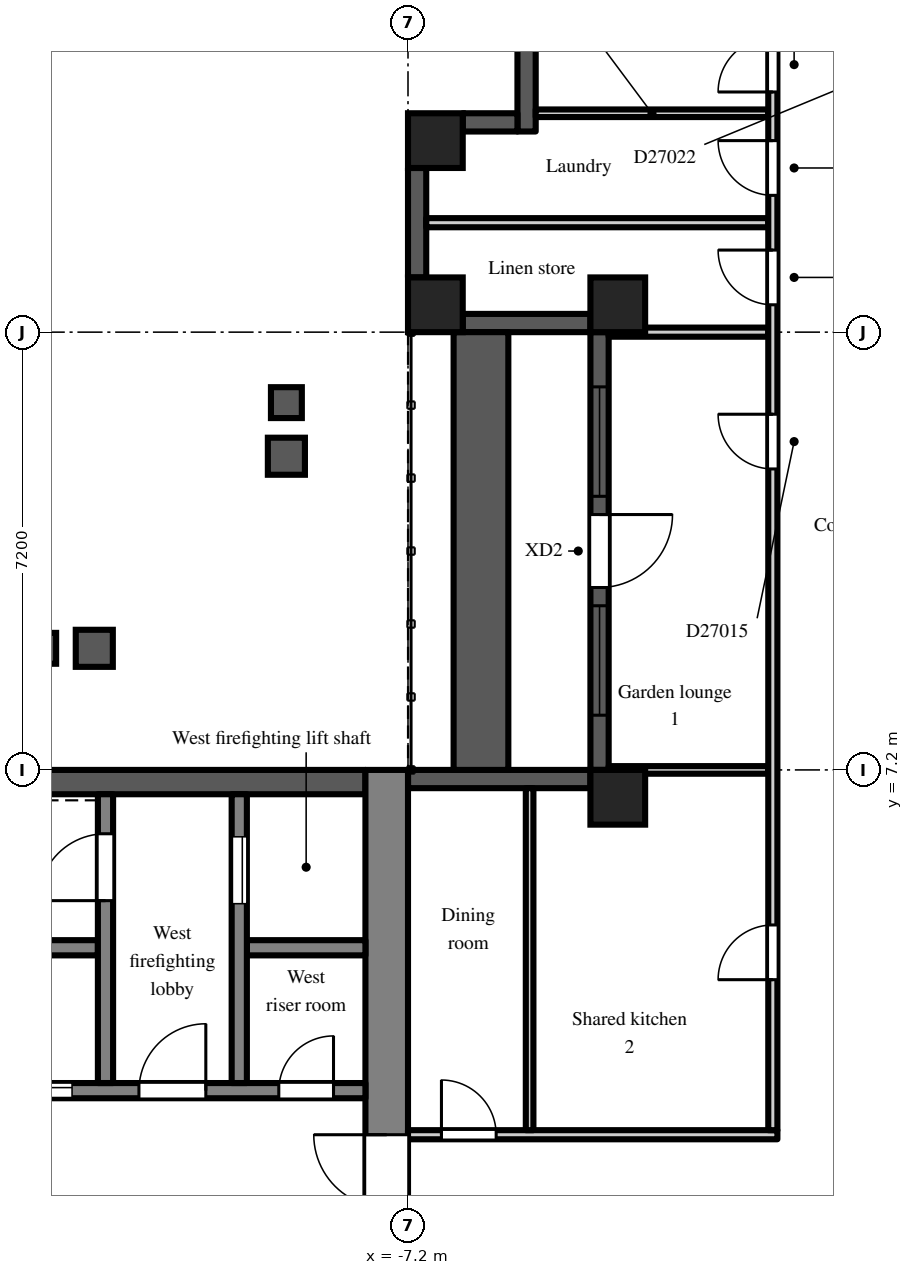
"""IFC4 building model, lengths in metres.
Left out: names, types, materials, properties, quantities, classifications, styles, units other than length and angle.
Written with IfcOpenShell. Run it as: python <this file> out.ifc"""

import sys

from ifc_helpers import new_model, si_unit, direction, frame, frame_2d, origin, origin_2d, place, context, subcontext, project, spatial, rectangle, extrude, element, fill, save


model = new_model("IFC4")
c1 = context("Model", 3, precision=1e-05, world=origin(), true_north=direction((0.0, 1.0)))
c2 = subcontext(c1, "Body", "Model", "MODEL_VIEW")
j1 = project(units=[si_unit("LENGTHUNIT", "METRE"), si_unit("PLANEANGLEUNIT", "RADIAN")], contexts=[c1])
p1 = place(None, origin())
s1 = spatial("IfcSite", under=j1, at=p1, CompositionType="ELEMENT")
p2 = place(p1, origin())
s2 = spatial("IfcBuilding", under=s1, at=p2, CompositionType="ELEMENT")
p3 = place(p2, frame((0.0, 0.0, 188.7)))
s3 = spatial("IfcBuildingStorey", under=s2, at=p3, CompositionType="ELEMENT", Elevation=188.7)
for number, where, z_axis, x_axis in (
    (1, (-6.75, 14.85, 0.0), (0.0, 0.0, 1.0), (1.0, 0.0, 0.0)),
    (2, (-6.75, 17.55, 0.0), (0.0, 0.0, 1.0), (1.0, 0.0, 0.0)),
    (3, (-3.75, 6.75, 0.0), (0.0, 0.0, 1.0), (1.0, 0.0, 0.0)),
    (4, (-3.75, 14.85, 0.0), (0.0, 0.0, 1.0), (1.0, 0.0, 0.0)),
):
    element("IfcColumn", number, at=place(p3, frame(where, z_axis=z_axis, x_axis=x_axis)), inside=s3, PredefinedType="COLUMN", context=c2, shape_type="SweptSolid", body=[
        extrude(rectangle(XDim=0.9, YDim=0.9, at=origin_2d()), origin(), (0.0, 0.0, 1.0), 3.0),
    ])
p4 = place(p3, frame((-5.25, 19.5, 0.0), z_axis=(0.0, 0.0, 1.0), x_axis=(0.0, -1.0, 0.0)))
e5 = element("IfcWall", 5, at=p4, inside=s3, PredefinedType="SOLIDWALL", context=c2, shape_type="SweptSolid", body=[
    extrude(rectangle(XDim=1.8, YDim=0.3, at=frame_2d((0.9, 0.0))), origin(), (0.0, 0.0, 1.0), 2.6),
])
p5 = place(p3, frame((-5.4, 17.85, 0.0), z_axis=(0.0, 0.0, 1.0), x_axis=(-1.0, 0.0, 0.0)))
e6 = element("IfcWall", 6, at=p5, inside=s3, PredefinedType="SOLIDWALL", context=c2, shape_type="SweptSolid", body=[
    extrude(rectangle(XDim=0.9, YDim=0.3, at=frame_2d((0.45, 0.0))), origin(), (0.0, 0.0, 1.0), 2.6),
])
p6 = place(p3, frame((-7.05, 17.1, 0.0), z_axis=(0.0, 0.0, 1.0), x_axis=(0.0, -1.0, 0.0)))
e7 = element("IfcWall", 7, at=p6, inside=s3, PredefinedType="SOLIDWALL", context=c2, shape_type="SweptSolid", body=[
    extrude(rectangle(XDim=1.8, YDim=0.3, at=frame_2d((0.9, 0.0))), origin(), (0.0, 0.0, 1.0), 2.2),
])
p7 = place(p3, frame((-6.3, 14.55, 0.0), z_axis=(0.0, 0.0, 1.0), x_axis=(1.0, 0.0, 0.0)))
e8 = element("IfcWall", 8, at=p7, inside=s3, PredefinedType="SOLIDWALL", context=c2, shape_type="SweptSolid", body=[
    extrude(rectangle(XDim=2.1, YDim=0.3, at=frame_2d((1.05, 0.0))), origin(), (0.0, 0.0, 1.0), 2.2),
])
p8 = place(p3, frame((-4.05, 14.4, 0.0), z_axis=(0.0, 0.0, 1.0), x_axis=(0.0, -1.0, 0.0)))
e9 = element("IfcWall", 9, at=p8, inside=s3, PredefinedType="SOLIDWALL", context=c2, shape_type="SweptSolid", body=[
    extrude(rectangle(XDim=7.2, YDim=0.3, at=frame_2d((3.6, 0.0))), origin(), (0.0, 0.0, 1.0), 2.2),
])
p9 = place(p8, frame((3.0, 0.0, 0.0)))
e10 = element("IfcOpeningElement", 10, at=p9, cuts=e9, PredefinedType="OPENING", context=c2, shape_type="SweptSolid", body=[
    extrude(rectangle(XDim=1.2, YDim=2.05, at=frame_2d((0.6, 1.025))), frame((0.0, 0.16, 0.0), z_axis=(0.0, -1.0, 0.0), x_axis=(1.0, 0.0, 0.0)), (0.0, 0.0, 1.0), 0.32),
])
p10 = place(p8, frame((0.9, 0.0, 0.2)))
e11 = element("IfcOpeningElement", 11, at=p10, cuts=e9, PredefinedType="OPENING", context=c2, shape_type="SweptSolid", body=[
    extrude(rectangle(XDim=1.8, YDim=1.85, at=frame_2d((0.9, 0.925))), frame((0.0, 0.16, 0.0), z_axis=(0.0, -1.0, 0.0), x_axis=(1.0, 0.0, 0.0)), (0.0, 0.0, 1.0), 0.32),
])
p11 = place(p8, frame((4.5, 0.0, 0.2)))
e12 = element("IfcOpeningElement", 12, at=p11, cuts=e9, PredefinedType="OPENING", context=c2, shape_type="SweptSolid", body=[
    extrude(rectangle(XDim=1.8, YDim=1.85, at=frame_2d((0.9, 0.925))), frame((0.0, 0.16, 0.0), z_axis=(0.0, -1.0, 0.0), x_axis=(1.0, 0.0, 0.0)), (0.0, 0.0, 1.0), 0.32),
])
p12 = place(p3, frame((-4.2, 7.05, 0.0), z_axis=(0.0, 0.0, 1.0), x_axis=(-1.0, 0.0, 0.0)))
e13 = element("IfcWall", 13, at=p12, inside=s3, PredefinedType="SOLIDWALL", context=c2, shape_type="SweptSolid", body=[
    extrude(rectangle(XDim=3.0, YDim=0.3, at=frame_2d((1.5, 0.0))), origin(), (0.0, 0.0, 1.0), 2.2),
])
p13 = place(p3, frame((-6.0, 7.2, 0.0), z_axis=(0.0, 0.0, 1.0), x_axis=(0.0, 1.0, 0.0)))
e14 = element("IfcWall", 14, at=p13, inside=s3, PredefinedType="PARAPET", context=c2, shape_type="SweptSolid", body=[
    extrude(rectangle(XDim=7.2, YDim=0.9, at=frame_2d((3.6, 0.0))), origin(), (0.0, 0.0, 1.0), 0.8),
])
p14 = place(p3, frame((-7.55, -7.2, 0.0), z_axis=(0.0, 0.0, 1.0), x_axis=(0.0, 1.0, 0.0)))
e15 = element("IfcWall", 15, at=p14, inside=s3, PredefinedType="SHEAR", context=c2, shape_type="SweptSolid", body=[
    extrude(rectangle(XDim=14.4, YDim=0.7, at=frame_2d((7.2, 0.0))), origin(), (0.0, 0.0, 1.0), 2.6),
])
p15 = place(p14, frame((6.0, 0.0, 0.0)))
e16 = element("IfcOpeningElement", 16, at=p15, cuts=e15, PredefinedType="OPENING", context=c2, shape_type="SweptSolid", body=[
    extrude(rectangle(XDim=2.4, YDim=2.2, at=frame_2d((1.2, 1.1))), frame((0.0, 0.36, 0.0), z_axis=(0.0, -1.0, 0.0), x_axis=(1.0, 0.0, 0.0)), (0.0, 0.0, 1.0), 0.72),
])
p16 = place(p3, frame((-7.9, 7.0, 0.0), z_axis=(0.0, 0.0, 1.0), x_axis=(-1.0, 0.0, 0.0)))
e17 = element("IfcWall", 17, at=p16, inside=s3, PredefinedType="SHEAR", context=c2, shape_type="SweptSolid", body=[
    extrude(rectangle(XDim=12.95, YDim=0.4, at=frame_2d((6.475, 0.0))), origin(), (0.0, 0.0, 1.0), 2.6),
])
p17 = place(p3, frame((-7.9, 1.925, 0.0), z_axis=(0.0, 0.0, 1.0), x_axis=(-1.0, 0.0, 0.0)))
e18 = element("IfcWall", 18, at=p17, inside=s3, PredefinedType="SHEAR", context=c2, shape_type="SweptSolid", body=[
    extrude(rectangle(XDim=12.95, YDim=0.25, at=frame_2d((6.475, 0.0))), origin(), (0.0, 0.0, 1.0), 2.6),
])
p18 = place(p17, frame((4.825, 0.0, 0.0)))
e19 = element("IfcOpeningElement", 19, at=p18, cuts=e18, PredefinedType="OPENING", context=c2, shape_type="SweptSolid", body=[
    extrude(rectangle(XDim=1.1, YDim=2.1, at=frame_2d((0.55, 1.05))), frame((0.0, 0.135, 0.0), z_axis=(0.0, -1.0, 0.0), x_axis=(1.0, 0.0, 0.0)), (0.0, 0.0, 1.0), 0.27),
])
p19 = place(p17, frame((7.025, 0.0, 0.0)))
e20 = element("IfcOpeningElement", 20, at=p19, cuts=e18, PredefinedType="OPENING", context=c2, shape_type="SweptSolid", body=[
    extrude(rectangle(XDim=1.1, YDim=2.1, at=frame_2d((0.55, 1.05))), frame((0.0, 0.135, 0.0), z_axis=(0.0, -1.0, 0.0), x_axis=(1.0, 0.0, 0.0)), (0.0, 0.0, 1.0), 0.27),
])
p20 = place(p17, frame((9.225, 0.0, 0.0)))
e21 = element("IfcOpeningElement", 21, at=p20, cuts=e18, PredefinedType="OPENING", context=c2, shape_type="SweptSolid", body=[
    extrude(rectangle(XDim=1.1, YDim=2.1, at=frame_2d((0.55, 1.05))), frame((0.0, 0.135, 0.0), z_axis=(0.0, -1.0, 0.0), x_axis=(1.0, 0.0, 0.0)), (0.0, 0.0, 1.0), 0.27),
])
p21 = place(p17, frame((0.525, 0.0, 0.0)))
e22 = element("IfcOpeningElement", 22, at=p21, cuts=e18, PredefinedType="OPENING", context=c2, shape_type="SweptSolid", body=[
    extrude(rectangle(XDim=0.9, YDim=2.1, at=frame_2d((0.45, 1.05))), frame((0.0, 0.135, 0.0), z_axis=(0.0, -1.0, 0.0), x_axis=(1.0, 0.0, 0.0)), (0.0, 0.0, 1.0), 0.27),
])
p22 = place(p17, frame((2.625, 0.0, 0.0)))
e23 = element("IfcOpeningElement", 23, at=p22, cuts=e18, PredefinedType="OPENING", context=c2, shape_type="SweptSolid", body=[
    extrude(rectangle(XDim=1.1, YDim=2.1, at=frame_2d((0.55, 1.05))), frame((0.0, 0.135, 0.0), z_axis=(0.0, -1.0, 0.0), x_axis=(1.0, 0.0, 0.0)), (0.0, 0.0, 1.0), 0.27),
])
p23 = place(p17, frame((11.525, 0.0, 0.0)))
e24 = element("IfcOpeningElement", 24, at=p23, cuts=e18, PredefinedType="OPENING", context=c2, shape_type="SweptSolid", body=[
    extrude(rectangle(XDim=0.9, YDim=2.1, at=frame_2d((0.45, 1.05))), frame((0.0, 0.135, 0.0), z_axis=(0.0, -1.0, 0.0), x_axis=(1.0, 0.0, 0.0)), (0.0, 0.0, 1.0), 0.27),
])
p24 = place(p3, frame((-7.9, 4.275, 0.0), z_axis=(0.0, 0.0, 1.0), x_axis=(-1.0, 0.0, 0.0)))
e25 = element("IfcWall", 25, at=p24, inside=s3, PredefinedType="SHEAR", context=c2, shape_type="SweptSolid", body=[
    extrude(rectangle(XDim=1.95, YDim=0.25, at=frame_2d((0.975, 0.0))), origin(), (0.0, 0.0, 1.0), 2.6),
])
p25 = place(p3, frame((-12.3, 4.275, 0.0), z_axis=(0.0, 0.0, 1.0), x_axis=(-1.0, 0.0, 0.0)))
e26 = element("IfcWall", 26, at=p25, inside=s3, PredefinedType="SHEAR", context=c2, shape_type="SweptSolid", body=[
    extrude(rectangle(XDim=8.55, YDim=0.25, at=frame_2d((4.275, 0.0))), origin(), (0.0, 0.0, 1.0), 2.6),
])
p26 = place(p3, frame((-9.975, 2.05, 0.0), z_axis=(0.0, 0.0, 1.0), x_axis=(0.0, 1.0, 0.0)))
e27 = element("IfcWall", 27, at=p26, inside=s3, PredefinedType="SHEAR", context=c2, shape_type="SweptSolid", body=[
    extrude(rectangle(XDim=4.75, YDim=0.25, at=frame_2d((2.375, 0.0))), origin(), (0.0, 0.0, 1.0), 2.6),
])
p27 = place(p26, frame((2.95, 0.0, 0.0)))
e28 = element("IfcOpeningElement", 28, at=p27, cuts=e27, PredefinedType="OPENING", context=c2, shape_type="SweptSolid", body=[
    extrude(rectangle(XDim=1.1, YDim=2.1, at=frame_2d((0.55, 1.05))), frame((0.0, 0.135, 0.0), z_axis=(0.0, -1.0, 0.0), x_axis=(1.0, 0.0, 0.0)), (0.0, 0.0, 1.0), 0.27),
])
p28 = place(p3, frame((-12.175, 2.05, 0.0), z_axis=(0.0, 0.0, 1.0), x_axis=(0.0, 1.0, 0.0)))
e29 = element("IfcWall", 29, at=p28, inside=s3, PredefinedType="SHEAR", context=c2, shape_type="SweptSolid", body=[
    extrude(rectangle(XDim=4.75, YDim=0.25, at=frame_2d((2.375, 0.0))), origin(), (0.0, 0.0, 1.0), 2.6),
])
p29 = place(p28, frame((3.0, 0.0, 0.0)))
e30 = element("IfcOpeningElement", 30, at=p29, cuts=e29, PredefinedType="OPENING", context=c2, shape_type="SweptSolid", body=[
    extrude(rectangle(XDim=1.1, YDim=2.1, at=frame_2d((0.55, 1.05))), frame((0.0, 0.135, 0.0), z_axis=(0.0, -1.0, 0.0), x_axis=(1.0, 0.0, 0.0)), (0.0, 0.0, 1.0), 0.27),
])
p30 = place(p3, frame((-7.2, 1.2, 0.0), z_axis=(0.0, 0.0, 1.0), x_axis=(1.0, 0.0, 0.0)))
e31 = element("IfcWall", 31, at=p30, inside=s3, PredefinedType="PARTITIONING", context=c2, shape_type="SweptSolid", body=[
    extrude(rectangle(XDim=6.075, YDim=0.15, at=frame_2d((3.038, 0.0))), origin(), (0.0, 0.0, 1.0), 2.6),
])
p31 = place(p30, frame((0.55, 0.0, 0.0)))
e32 = element("IfcOpeningElement", 32, at=p31, cuts=e31, PredefinedType="OPENING", context=c2, shape_type="SweptSolid", body=[
    extrude(rectangle(XDim=0.9, YDim=2.1, at=frame_2d((0.45, 1.05))), frame((0.0, 0.085, 0.0), z_axis=(0.0, -1.0, 0.0), x_axis=(1.0, 0.0, 0.0)), (0.0, 0.0, 1.0), 0.17),
])
p32 = place(p3, frame((-6.9, 16.2, 0.0), z_axis=(0.0, 0.0, 1.0), x_axis=(1.0, 0.0, 0.0)))
e33 = element("IfcWall", 33, at=p32, inside=s3, PredefinedType="PARTITIONING", context=c2, shape_type="SweptSolid", body=[
    extrude(rectangle(XDim=5.625, YDim=0.15, at=frame_2d((2.812, 0.0))), origin(), (0.0, 0.0, 1.0), 2.6),
])
p33 = place(p3, frame((-5.2, 1.275, 0.0), z_axis=(0.0, 0.0, 1.0), x_axis=(0.0, 1.0, 0.0)))
e34 = element("IfcWall", 34, at=p33, inside=s3, PredefinedType="PARTITIONING", context=c2, shape_type="SweptSolid", body=[
    extrude(rectangle(XDim=5.625, YDim=0.125, at=frame_2d((2.812, 0.0))), origin(), (0.0, 0.0, 1.0), 2.6),
])
p34 = place(p3, frame((-5.1, 18.0, 0.0), z_axis=(0.0, 0.0, 1.0), x_axis=(1.0, 0.0, 0.0)))
e35 = element("IfcWall", 35, at=p34, inside=s3, PredefinedType="PARTITIONING", context=c2, shape_type="SweptSolid", body=[
    extrude(rectangle(XDim=3.825, YDim=0.125, at=frame_2d((1.913, 0.0))), origin(), (0.0, 0.0, 1.0), 2.6),
])
p35 = place(p3, frame((-3.9, 7.2, 0.0), z_axis=(0.0, 0.0, 1.0), x_axis=(1.0, 0.0, 0.0)))
e36 = element("IfcWall", 36, at=p35, inside=s3, PredefinedType="PARTITIONING", context=c2, shape_type="SweptSolid", body=[
    extrude(rectangle(XDim=2.625, YDim=0.125, at=frame_2d((1.312, 0.0))), origin(), (0.0, 0.0, 1.0), 2.6),
])
p36 = place(p3, frame((-3.9, 14.4, 0.0), z_axis=(0.0, 0.0, 1.0), x_axis=(1.0, 0.0, 0.0)))
e37 = element("IfcWall", 37, at=p36, inside=s3, PredefinedType="PARTITIONING", context=c2, shape_type="SweptSolid", body=[
    extrude(rectangle(XDim=2.625, YDim=0.15, at=frame_2d((1.312, 0.0))), origin(), (0.0, 0.0, 1.0), 2.6),
])
p37 = place(p3, frame((-1.2, 1.275, 0.0), z_axis=(0.0, 0.0, 1.0), x_axis=(0.0, 1.0, 0.0)))
e38 = element("IfcWall", 38, at=p37, inside=s3, PredefinedType="PARTITIONING", context=c2, shape_type="SweptSolid", body=[
    extrude(rectangle(XDim=18.25, YDim=0.15, at=frame_2d((9.125, 0.0))), origin(), (0.0, 0.0, 1.0), 2.6),
])
p38 = place(p37, frame((2.475, 0.0, 0.0)))
e39 = element("IfcOpeningElement", 39, at=p38, cuts=e38, PredefinedType="OPENING", context=c2, shape_type="SweptSolid", body=[
    extrude(rectangle(XDim=0.9, YDim=2.1, at=frame_2d((0.45, 1.05))), frame((0.0, 0.085, 0.0), z_axis=(0.0, -1.0, 0.0), x_axis=(1.0, 0.0, 0.0)), (0.0, 0.0, 1.0), 0.17),
])
p39 = place(p37, frame((10.875, 0.0, 0.0)))
e40 = element("IfcOpeningElement", 40, at=p39, cuts=e38, PredefinedType="OPENING", context=c2, shape_type="SweptSolid", body=[
    extrude(rectangle(XDim=0.9, YDim=2.1, at=frame_2d((0.45, 1.05))), frame((0.0, 0.085, 0.0), z_axis=(0.0, -1.0, 0.0), x_axis=(1.0, 0.0, 0.0)), (0.0, 0.0, 1.0), 0.17),
])
p40 = place(p37, frame((13.575, 0.0, 0.0)))
e41 = element("IfcOpeningElement", 41, at=p40, cuts=e38, PredefinedType="OPENING", context=c2, shape_type="SweptSolid", body=[
    extrude(rectangle(XDim=0.9, YDim=2.1, at=frame_2d((0.45, 1.05))), frame((0.0, 0.085, 0.0), z_axis=(0.0, -1.0, 0.0), x_axis=(1.0, 0.0, 0.0)), (0.0, 0.0, 1.0), 0.17),
])
p41 = place(p37, frame((15.375, 0.0, 0.0)))
e42 = element("IfcOpeningElement", 42, at=p41, cuts=e38, PredefinedType="OPENING", context=c2, shape_type="SweptSolid", body=[
    extrude(rectangle(XDim=0.9, YDim=2.1, at=frame_2d((0.45, 1.05))), frame((0.0, 0.085, 0.0), z_axis=(0.0, -1.0, 0.0), x_axis=(1.0, 0.0, 0.0)), (0.0, 0.0, 1.0), 0.17),
])
p42 = place(p37, frame((17.075, 0.0, 0.0)))
e43 = element("IfcOpeningElement", 43, at=p42, cuts=e38, PredefinedType="OPENING", context=c2, shape_type="SweptSolid", body=[
    extrude(rectangle(XDim=0.9, YDim=2.1, at=frame_2d((0.45, 1.05))), frame((0.0, 0.085, 0.0), z_axis=(0.0, -1.0, 0.0), x_axis=(1.0, 0.0, 0.0)), (0.0, 0.0, 1.0), 0.17),
])
p43 = place(p9, origin())
e44 = element("IfcDoor", 44, at=p43, inside=s3, OperationType="SINGLE_SWING_LEFT", PredefinedType="DOOR", context=c2, shape_type="SweptSolid", body=[
    extrude(rectangle(XDim=1.2, YDim=2.05, at=frame_2d((0.6, 1.025))), frame((0.0, 0.025, 0.0), z_axis=(0.0, -1.0, 0.0), x_axis=(1.0, 0.0, 0.0)), (0.0, 0.0, 1.0), 0.05),
])
fill(e10, e44)
p44 = place(p10, origin())
e45 = element("IfcWindow", 45, at=p44, inside=s3, PartitioningType="SINGLE_PANEL", PredefinedType="WINDOW", context=c2, shape_type="SweptSolid", body=[
    extrude(rectangle(XDim=1.8, YDim=1.85, at=frame_2d((0.9, 0.925))), frame((0.0, 0.03, 0.0), z_axis=(0.0, -1.0, 0.0), x_axis=(1.0, 0.0, 0.0)), (0.0, 0.0, 1.0), 0.06),
])
fill(e11, e45)
p45 = place(p11, origin())
e46 = element("IfcWindow", 46, at=p45, inside=s3, PartitioningType="SINGLE_PANEL", PredefinedType="WINDOW", context=c2, shape_type="SweptSolid", body=[
    extrude(rectangle(XDim=1.8, YDim=1.85, at=frame_2d((0.9, 0.925))), frame((0.0, 0.03, 0.0), z_axis=(0.0, -1.0, 0.0), x_axis=(1.0, 0.0, 0.0)), (0.0, 0.0, 1.0), 0.06),
])
fill(e12, e46)
p46 = place(p18, origin())
e47 = element("IfcDoor", 47, at=p46, inside=s3, OperationType="SLIDING_TO_LEFT", PredefinedType="DOOR", context=c2, shape_type="SweptSolid", body=[
    extrude(rectangle(XDim=1.1, YDim=2.1, at=frame_2d((0.55, 1.05))), frame((0.0, 0.025, 0.0), z_axis=(0.0, -1.0, 0.0), x_axis=(1.0, 0.0, 0.0)), (0.0, 0.0, 1.0), 0.05),
])
fill(e19, e47)
p47 = place(p27, origin())
e48 = element("IfcDoor", 48, at=p47, inside=s3, OperationType="SLIDING_TO_LEFT", PredefinedType="DOOR", context=c2, shape_type="SweptSolid", body=[
    extrude(rectangle(XDim=1.1, YDim=2.1, at=frame_2d((0.55, 1.05))), frame((0.0, 0.025, 0.0), z_axis=(0.0, -1.0, 0.0), x_axis=(1.0, 0.0, 0.0)), (0.0, 0.0, 1.0), 0.05),
])
fill(e28, e48)
p48 = place(p29, origin())
e49 = element("IfcDoor", 49, at=p48, inside=s3, OperationType="SINGLE_SWING_LEFT", PredefinedType="DOOR", context=c2, shape_type="SweptSolid", body=[
    extrude(rectangle(XDim=1.1, YDim=2.1, at=frame_2d((0.55, 1.05))), frame((0.0, 0.025, 0.0), z_axis=(0.0, -1.0, 0.0), x_axis=(1.0, 0.0, 0.0)), (0.0, 0.0, 1.0), 0.05),
])
fill(e30, e49)
p49 = place(p21, frame((0.9, 0.0, 0.0), z_axis=(0.0, 0.0, 1.0), x_axis=(-1.0, 0.0, 0.0)))
e50 = element("IfcDoor", 50, at=p49, inside=s3, OperationType="SINGLE_SWING_RIGHT", PredefinedType="DOOR", context=c2, shape_type="SweptSolid", body=[
    extrude(rectangle(XDim=0.9, YDim=2.1, at=frame_2d((0.45, 1.05))), frame((0.0, 0.025, 0.0), z_axis=(0.0, -1.0, 0.0), x_axis=(1.0, 0.0, 0.0)), (0.0, 0.0, 1.0), 0.05),
])
fill(e22, e50)
p50 = place(p22, frame((1.1, 0.0, 0.0), z_axis=(0.0, 0.0, 1.0), x_axis=(-1.0, 0.0, 0.0)))
e51 = element("IfcDoor", 51, at=p50, inside=s3, OperationType="SINGLE_SWING_RIGHT", PredefinedType="DOOR", context=c2, shape_type="SweptSolid", body=[
    extrude(rectangle(XDim=1.1, YDim=2.1, at=frame_2d((0.55, 1.05))), frame((0.0, 0.025, 0.0), z_axis=(0.0, -1.0, 0.0), x_axis=(1.0, 0.0, 0.0)), (0.0, 0.0, 1.0), 0.05),
])
fill(e23, e51)
p51 = place(p15, origin())
e52 = element("IfcDoor", 52, at=p51, inside=s3, OperationType="DOUBLE_DOOR_DOUBLE_SWING", PredefinedType="DOOR", context=c2, shape_type="SweptSolid", body=[
    extrude(rectangle(XDim=2.4, YDim=2.2, at=frame_2d((1.2, 1.1))), frame((0.0, 0.025, 0.0), z_axis=(0.0, -1.0, 0.0), x_axis=(1.0, 0.0, 0.0)), (0.0, 0.0, 1.0), 0.05),
])
fill(e16, e52)
p52 = place(p38, origin())
e53 = element("IfcDoor", 53, at=p52, inside=s3, OperationType="SINGLE_SWING_LEFT", PredefinedType="DOOR", context=c2, shape_type="SweptSolid", body=[
    extrude(rectangle(XDim=0.9, YDim=2.1, at=frame_2d((0.45, 1.05))), frame((0.0, 0.025, 0.0), z_axis=(0.0, -1.0, 0.0), x_axis=(1.0, 0.0, 0.0)), (0.0, 0.0, 1.0), 0.05),
])
fill(e39, e53)
p53 = place(p31, origin())
e54 = element("IfcDoor", 54, at=p53, inside=s3, OperationType="SINGLE_SWING_LEFT", PredefinedType="DOOR", context=c2, shape_type="SweptSolid", body=[
    extrude(rectangle(XDim=0.9, YDim=2.1, at=frame_2d((0.45, 1.05))), frame((0.0, 0.025, 0.0), z_axis=(0.0, -1.0, 0.0), x_axis=(1.0, 0.0, 0.0)), (0.0, 0.0, 1.0), 0.05),
])
fill(e32, e54)
p54 = place(p39, origin())
e55 = element("IfcDoor", 55, at=p54, inside=s3, OperationType="SINGLE_SWING_RIGHT", PredefinedType="DOOR", context=c2, shape_type="SweptSolid", body=[
    extrude(rectangle(XDim=0.9, YDim=2.1, at=frame_2d((0.45, 1.05))), frame((0.0, 0.025, 0.0), z_axis=(0.0, -1.0, 0.0), x_axis=(1.0, 0.0, 0.0)), (0.0, 0.0, 1.0), 0.05),
])
fill(e40, e55)
p55 = place(p40, origin())
e56 = element("IfcDoor", 56, at=p55, inside=s3, OperationType="SINGLE_SWING_RIGHT", PredefinedType="DOOR", context=c2, shape_type="SweptSolid", body=[
    extrude(rectangle(XDim=0.9, YDim=2.1, at=frame_2d((0.45, 1.05))), frame((0.0, 0.025, 0.0), z_axis=(0.0, -1.0, 0.0), x_axis=(1.0, 0.0, 0.0)), (0.0, 0.0, 1.0), 0.05),
])
fill(e41, e56)
p56 = place(p41, origin())
e57 = element("IfcDoor", 57, at=p56, inside=s3, OperationType="SINGLE_SWING_RIGHT", PredefinedType="DOOR", context=c2, shape_type="SweptSolid", body=[
    extrude(rectangle(XDim=0.9, YDim=2.1, at=frame_2d((0.45, 1.05))), frame((0.0, 0.025, 0.0), z_axis=(0.0, -1.0, 0.0), x_axis=(1.0, 0.0, 0.0)), (0.0, 0.0, 1.0), 0.05),
])
fill(e42, e57)
p57 = place(p42, origin())
e58 = element("IfcDoor", 58, at=p57, inside=s3, OperationType="SINGLE_SWING_LEFT", PredefinedType="DOOR", context=c2, shape_type="SweptSolid", body=[
    extrude(rectangle(XDim=0.9, YDim=2.1, at=frame_2d((0.45, 1.05))), frame((0.0, 0.025, 0.0), z_axis=(0.0, -1.0, 0.0), x_axis=(1.0, 0.0, 0.0)), (0.0, 0.0, 1.0), 0.05),
])
fill(e43, e58)
save(model, sys.argv[1])
